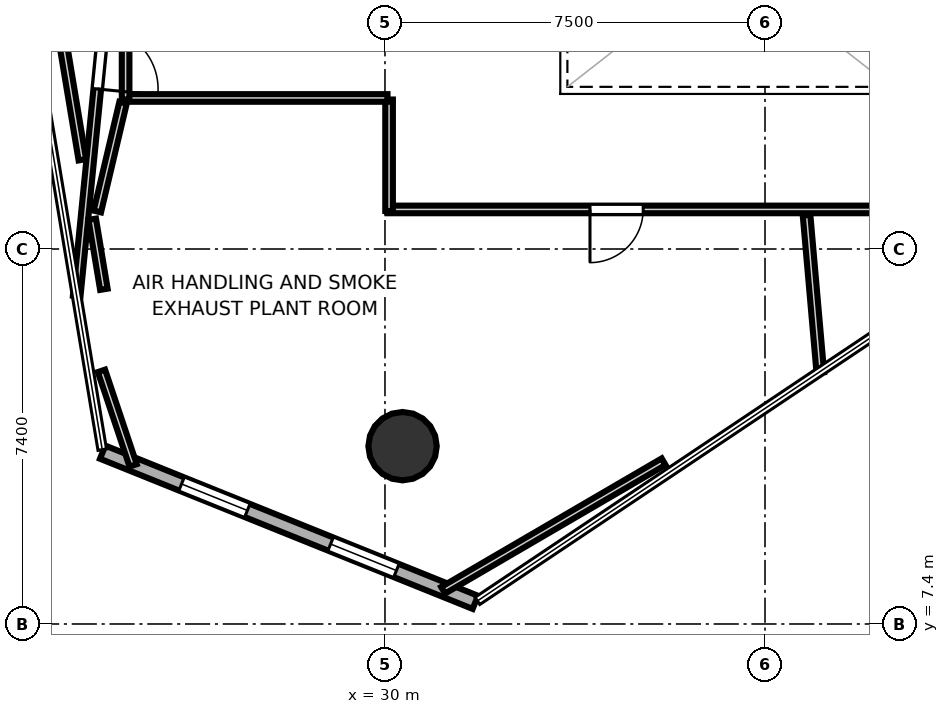
"""IFC4 building model, lengths in metres.
Left out: names, types, materials, properties, quantities, classifications, styles, units other than length and angle.
Written with IfcOpenShell. Run it as: python <this file> out.ifc"""

import sys

from ifc_helpers import new_model, si_unit, direction, frame, frame_2d, origin, origin_2d, place, context, subcontext, project, spatial, rectangle, hollow_circle, extrude, element, fill, save


model = new_model("IFC4")
c1 = context("Model", 3, precision=1e-05, world=origin(), true_north=direction((0.0, 1.0)))
c2 = subcontext(c1, "Body", "Model", "MODEL_VIEW")
j1 = project(units=[si_unit("LENGTHUNIT", "METRE"), si_unit("PLANEANGLEUNIT", "RADIAN")], contexts=[c1])
p1 = place(None, origin())
s1 = spatial("IfcSite", under=j1, at=p1, CompositionType="ELEMENT")
p2 = place(p1, origin())
s2 = spatial("IfcBuilding", under=s1, at=p2, CompositionType="ELEMENT")
p3 = place(p2, frame((0.0, 0.0, 184.6)))
s3 = spatial("IfcBuildingStorey", under=s2, at=p3, CompositionType="ELEMENT", Elevation=184.6)
p4 = place(p3, frame((30.347, 10.909, 0.0), z_axis=(0.0, 0.0, 1.0), x_axis=(1.0, 0.0, 0.0)))
e1 = element("IfcColumn", 1, at=p4, inside=s3, PredefinedType="COLUMN", context=c2, shape_type="SweptSolid", body=[
    extrude(hollow_circle(Radius=0.675, WallThickness=0.032, at=origin_2d()), origin(), (0.0, 0.0, 1.0), 4.6),
])
p5 = place(p3, frame((24.428, 10.791, 0.0), z_axis=(0.0, 0.0, 1.0), x_axis=(0.927535144365, -0.373735944174, 0.0)))
e2 = element("IfcWall", 2, at=p5, inside=s3, PredefinedType="SOLIDWALL", context=c2, shape_type="SweptSolid", body=[
    extrude(rectangle(XDim=7.929, YDim=0.28, at=frame_2d((3.964, 0.0))), origin(), (0.0, 0.0, 1.0), 4.42),
])
p6 = place(p5, frame((1.679, 0.0, 1.0)))
e3 = element("IfcOpeningElement", 3, at=p6, cuts=e2, PredefinedType="OPENING", context=c2, shape_type="SweptSolid", body=[
    extrude(rectangle(XDim=1.4, YDim=1.5, at=frame_2d((0.7, 0.75))), frame((0.0, 0.15, 0.0), z_axis=(0.0, -1.0, 0.0), x_axis=(1.0, 0.0, 0.0)), (0.0, 0.0, 1.0), 0.3),
])
p7 = place(p5, frame((4.85, 0.0, 1.0)))
e4 = element("IfcOpeningElement", 4, at=p7, cuts=e2, PredefinedType="OPENING", context=c2, shape_type="SweptSolid", body=[
    extrude(rectangle(XDim=1.4, YDim=1.5, at=frame_2d((0.7, 0.75))), frame((0.0, 0.15, 0.0), z_axis=(0.0, -1.0, 0.0), x_axis=(1.0, 0.0, 0.0)), (0.0, 0.0, 1.0), 0.3),
])
p8 = place(p3, frame((24.028, 16.56, 0.0), z_axis=(0.0, 0.0, 1.0), x_axis=(-0.16403102715, 0.986455179991, 0.0)))
e5 = element("IfcWall", 5, at=p8, inside=s3, PredefinedType="PARTITIONING", context=c2, shape_type="SweptSolid", body=[
    extrude(rectangle(XDim=5.165, YDim=0.15, at=frame_2d((2.583, 0.0))), origin(), (0.0, 0.0, 1.0), 2.94),
])
p9 = place(p3, frame((24.689, 21.65, 0.0), z_axis=(0.0, 0.0, 1.0), x_axis=(-0.098885214939, -0.99509884648, 0.0)))
e6 = element("IfcWall", 6, at=p9, inside=s3, PredefinedType="PARTITIONING", context=c2, shape_type="SweptSolid", body=[
    extrude(rectangle(XDim=7.817, YDim=0.15, at=frame_2d((3.908, 0.0))), origin(), (0.0, 0.0, 1.0), 2.94),
])
p10 = place(p9, frame((2.509, 0.0, 0.0)))
e7 = element("IfcOpeningElement", 7, at=p10, cuts=e6, PredefinedType="OPENING", context=c2, shape_type="SweptSolid", body=[
    extrude(rectangle(XDim=1.2, YDim=2.15, at=frame_2d((0.6, 1.075))), frame((0.0, 0.085, 0.0), z_axis=(0.0, -1.0, 0.0), x_axis=(1.0, 0.0, 0.0)), (0.0, 0.0, 1.0), 0.17),
])
p11 = place(p3, frame((43.388, 15.581, 0.0), z_axis=(0.0, 0.0, 1.0), x_axis=(-1.0, 0.0, 0.0)))
e8 = element("IfcWall", 8, at=p11, inside=s3, PredefinedType="PARTITIONING", context=c2, shape_type="SweptSolid", body=[
    extrude(rectangle(XDim=13.338, YDim=0.15, at=frame_2d((6.669, 0.0))), origin(), (0.0, 0.0, 1.0), 2.94),
])
p12 = place(p11, frame((8.292, 0.0, 0.0)))
e9 = element("IfcOpeningElement", 9, at=p12, cuts=e8, PredefinedType="OPENING", context=c2, shape_type="SweptSolid", body=[
    extrude(rectangle(XDim=1.05, YDim=2.15, at=frame_2d((0.525, 1.075))), frame((0.0, 0.085, 0.0), z_axis=(0.0, -1.0, 0.0), x_axis=(1.0, 0.0, 0.0)), (0.0, 0.0, 1.0), 0.17),
])
p13 = place(p3, frame((30.081, 15.55, 0.0), z_axis=(0.0, 0.0, 1.0), x_axis=(0.0, 1.0, 0.0)))
e10 = element("IfcWall", 10, at=p13, inside=s3, PredefinedType="PARTITIONING", context=c2, shape_type="SweptSolid", body=[
    extrude(rectangle(XDim=2.2, YDim=0.15, at=frame_2d((1.1, 0.0))), origin(), (0.0, 0.0, 1.0), 2.94),
])
p14 = place(p3, frame((30.05, 17.781, 0.0), z_axis=(0.0, 0.0, 1.0), x_axis=(-1.0, 0.0, 0.0)))
e11 = element("IfcWall", 11, at=p14, inside=s3, PredefinedType="PARTITIONING", context=c2, shape_type="SweptSolid", body=[
    extrude(rectangle(XDim=5.2, YDim=0.15, at=frame_2d((2.6, 0.0))), origin(), (0.0, 0.0, 1.0), 2.94),
])
p15 = place(p3, frame((24.881, 17.75, 0.0), z_axis=(0.0, 0.0, 1.0), x_axis=(0.0, 1.0, 0.0)))
e12 = element("IfcWall", 12, at=p15, inside=s3, PredefinedType="PARTITIONING", context=c2, shape_type="SweptSolid", body=[
    extrude(rectangle(XDim=3.405, YDim=0.15, at=frame_2d((1.703, 0.0))), origin(), (0.0, 0.0, 1.0), 2.94),
])
p16 = place(p3, frame((24.323, 15.54, 0.0), z_axis=(0.0, 0.0, 1.0), x_axis=(0.23022929388, 0.973136409883, 0.0)))
e13 = element("IfcWall", 13, at=p16, inside=s3, PredefinedType="PARTITIONING", context=c2, shape_type="SweptSolid", body=[
    extrude(rectangle(XDim=2.207, YDim=0.15, at=frame_2d((1.104, 0.0))), origin(), (0.0, 0.0, 1.0), 2.94),
])
p17 = place(p3, frame((38.32, 15.467, 0.0), z_axis=(0.0, 0.0, 1.0), x_axis=(0.087130014702, -0.996196948669, 0.0)))
e14 = element("IfcWall", 14, at=p17, inside=s3, PredefinedType="PARTITIONING", context=c2, shape_type="SweptSolid", body=[
    extrude(rectangle(XDim=3.116, YDim=0.15, at=frame_2d((1.558, 0.0))), origin(), (0.0, 0.0, 1.0), 2.94),
])
p18 = place(p3, frame((35.499, 10.603, 0.0), z_axis=(0.0, 0.0, 1.0), x_axis=(-0.863815813367, -0.50380774168, 0.0)))
e15 = element("IfcWall", 15, at=p18, inside=s3, PredefinedType="PARTITIONING", context=c2, shape_type="SweptSolid", body=[
    extrude(rectangle(XDim=5.037, YDim=0.15, at=frame_2d((2.519, 0.0))), origin(), (0.0, 0.0, 1.0), 2.94),
])
p19 = place(p3, frame((25.03, 10.53, 0.0), z_axis=(0.0, 0.0, 1.0), x_axis=(-0.317828246783, 0.948148303562, 0.0)))
e16 = element("IfcWall", 16, at=p19, inside=s3, PredefinedType="PARTITIONING", context=c2, shape_type="SweptSolid", body=[
    extrude(rectangle(XDim=1.967, YDim=0.15, at=frame_2d((0.984, 0.0))), origin(), (0.0, 0.0, 1.0), 2.94),
])
p20 = place(p3, frame((24.452, 14.005, 0.0), z_axis=(0.0, 0.0, 1.0), x_axis=(-0.164088259429, 0.986445661513, 0.0)))
e17 = element("IfcWall", 17, at=p20, inside=s3, PredefinedType="PARTITIONING", context=c2, shape_type="SweptSolid", body=[
    extrude(rectangle(XDim=1.402, YDim=0.15, at=frame_2d((0.701, 0.0))), origin(), (0.0, 0.0, 1.0), 2.94),
])
p21 = place(p10, origin())
e18 = element("IfcDoor", 18, at=p21, inside=s3, OperationType="SINGLE_SWING_RIGHT", PredefinedType="DOOR", context=c2, shape_type="SweptSolid", body=[
    extrude(rectangle(XDim=1.2, YDim=2.15, at=frame_2d((0.6, 1.075))), frame((0.0, 0.025, 0.0), z_axis=(0.0, -1.0, 0.0), x_axis=(1.0, 0.0, 0.0)), (0.0, 0.0, 1.0), 0.05),
])
fill(e7, e18)
p22 = place(p12, origin())
e19 = element("IfcDoor", 19, at=p22, inside=s3, OperationType="SINGLE_SWING_RIGHT", PredefinedType="DOOR", context=c2, shape_type="SweptSolid", body=[
    extrude(rectangle(XDim=1.05, YDim=2.15, at=frame_2d((0.525, 1.075))), frame((0.0, 0.025, 0.0), z_axis=(0.0, -1.0, 0.0), x_axis=(1.0, 0.0, 0.0)), (0.0, 0.0, 1.0), 0.05),
])
fill(e9, e19)
p23 = place(p6, origin())
e20 = element("IfcWindow", 20, at=p23, inside=s3, PartitioningType="SINGLE_PANEL", PredefinedType="WINDOW", context=c2, shape_type="SweptSolid", body=[
    extrude(rectangle(XDim=1.4, YDim=1.5, at=frame_2d((0.7, 0.75))), frame((0.0, 0.03, 0.0), z_axis=(0.0, -1.0, 0.0), x_axis=(1.0, 0.0, 0.0)), (0.0, 0.0, 1.0), 0.06),
])
fill(e3, e20)
p24 = place(p7, origin())
e21 = element("IfcWindow", 21, at=p24, inside=s3, PartitioningType="SINGLE_PANEL", PredefinedType="WINDOW", context=c2, shape_type="SweptSolid", body=[
    extrude(rectangle(XDim=1.4, YDim=1.5, at=frame_2d((0.7, 0.75))), frame((0.0, 0.03, 0.0), z_axis=(0.0, -1.0, 0.0), x_axis=(1.0, 0.0, 0.0)), (0.0, 0.0, 1.0), 0.06),
])
fill(e4, e21)
save(model, sys.argv[1])
